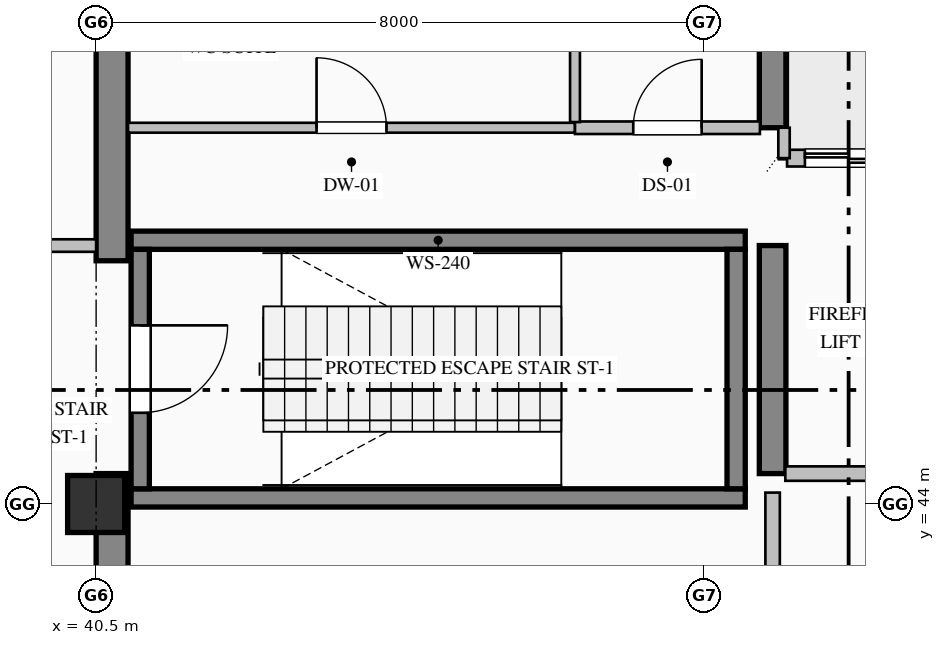
"""IFC4 building model, lengths in metres.
Left out: names, types, materials, properties, quantities, classifications, styles, units other than length and angle.
Written with IfcOpenShell. Run it as: python <this file> out.ifc"""

import sys

from ifc_helpers import new_model, si_unit, direction, frame, frame_2d, origin, origin_2d, place, context, subcontext, project, spatial, rectangle, extrude, element, fill, save


model = new_model("IFC4")
c1 = context("Model", 3, precision=1e-05, world=origin(), true_north=direction((0.0, 1.0)))
c2 = subcontext(c1, "Body", "Model", "MODEL_VIEW")
j1 = project(units=[si_unit("LENGTHUNIT", "METRE"), si_unit("PLANEANGLEUNIT", "RADIAN")], contexts=[c1])
p1 = place(None, origin())
s1 = spatial("IfcSite", under=j1, at=p1, CompositionType="ELEMENT")
p2 = place(p1, origin())
s2 = spatial("IfcBuilding", under=s1, at=p2, CompositionType="ELEMENT")
p3 = place(p2, frame((0.0, 0.0, 373.0)))
s3 = spatial("IfcBuildingStorey", under=s2, at=p3, CompositionType="ELEMENT", Elevation=373.0)
p4 = place(p3, frame((40.71, 36.42, 0.0), z_axis=(0.0, 0.0, 1.0), x_axis=(0.0, 1.0, 0.0)))
e1 = element("IfcWall", 1, at=p4, inside=s3, PredefinedType="SHEAR", context=c2, shape_type="SweptSolid", body=[
    extrude(rectangle(XDim=7.98, YDim=0.42, at=frame_2d((3.99, 0.0))), origin(), (0.0, 0.0, 1.0), 5.11),
])
p5 = place(p3, frame((40.71, 47.2, 0.0), z_axis=(0.0, 0.0, 1.0), x_axis=(0.0, 1.0, 0.0)))
e2 = element("IfcWall", 2, at=p5, inside=s3, PredefinedType="SHEAR", context=c2, shape_type="SweptSolid", body=[
    extrude(rectangle(XDim=4.38, YDim=0.42, at=frame_2d((2.19, 0.0))), origin(), (0.0, 0.0, 1.0), 5.11),
])
p6 = place(p3, frame((49.4, 44.4, 0.0), z_axis=(0.0, 0.0, 1.0), x_axis=(0.0, 1.0, 0.0)))
e3 = element("IfcWall", 3, at=p6, inside=s3, PredefinedType="SHEAR", context=c2, shape_type="SweptSolid", body=[
    extrude(rectangle(XDim=3.0, YDim=0.35, at=frame_2d((1.5, 0.0))), origin(), (0.0, 0.0, 1.0), 5.11),
])
p7 = place(p3, frame((49.4, 48.95, 0.0), z_axis=(0.0, 0.0, 1.0), x_axis=(0.0, 1.0, 0.0)))
e4 = element("IfcWall", 4, at=p7, inside=s3, PredefinedType="SHEAR", context=c2, shape_type="SweptSolid", body=[
    extrude(rectangle(XDim=2.63, YDim=0.35, at=frame_2d((1.315, 0.0))), origin(), (0.0, 0.0, 1.0), 5.11),
])
p8 = place(p3, frame((40.5, 44.0, 0.0), z_axis=(0.0, 0.0, 1.0), x_axis=(1.0, 0.0, 0.0)))
e5 = element("IfcColumn", 5, at=p8, inside=s3, PredefinedType="COLUMN", context=c2, shape_type="SweptSolid", body=[
    extrude(rectangle(XDim=0.75, YDim=0.75, at=origin_2d()), origin(), (0.0, 0.0, 1.0), 5.4),
])
for number, where, z_axis, x_axis in (
    (6, (40.96, 47.47, 0.0), (0.0, 0.0, 1.0), (1.0, 0.0, 0.0)),
    (7, (49.04, 44.08, 0.0), (0.0, 0.0, 1.0), (-1.0, 0.0, 0.0)),
):
    element("IfcWall", number, at=place(p3, frame(where, z_axis=z_axis, x_axis=x_axis)), inside=s3, PredefinedType="SOLIDWALL", context=c2, shape_type="SweptSolid", body=[
        extrude(rectangle(XDim=8.08, YDim=0.24, at=frame_2d((4.04, 0.0))), origin(), (0.0, 0.0, 1.0), 5.4),
    ])
p9 = place(p3, frame((41.08, 47.35, 0.0), z_axis=(0.0, 0.0, 1.0), x_axis=(0.0, -1.0, 0.0)))
e8 = element("IfcWall", 8, at=p9, inside=s3, PredefinedType="SOLIDWALL", context=c2, shape_type="SweptSolid", body=[
    extrude(rectangle(XDim=3.15, YDim=0.24, at=frame_2d((1.575, 0.0))), origin(), (0.0, 0.0, 1.0), 5.4),
])
p10 = place(p9, frame((1.0, 0.0, 0.0)))
e9 = element("IfcOpeningElement", 9, at=p10, cuts=e8, PredefinedType="OPENING", context=c2, shape_type="SweptSolid", body=[
    extrude(rectangle(XDim=1.15, YDim=2.2, at=frame_2d((0.575, 1.1))), frame((0.0, 0.13, 0.0), z_axis=(0.0, -1.0, 0.0), x_axis=(1.0, 0.0, 0.0)), (0.0, 0.0, 1.0), 0.26),
])
p11 = place(p3, frame((48.92, 44.2, 0.0), z_axis=(0.0, 0.0, 1.0), x_axis=(0.0, 1.0, 0.0)))
e10 = element("IfcWall", 10, at=p11, inside=s3, PredefinedType="SOLIDWALL", context=c2, shape_type="SweptSolid", body=[
    extrude(rectangle(XDim=3.15, YDim=0.24, at=frame_2d((1.575, 0.0))), origin(), (0.0, 0.0, 1.0), 5.4),
])
p12 = place(p3, frame((54.71, 48.55, 0.0), z_axis=(0.0, 0.0, 1.0), x_axis=(-1.0, 0.0, 0.0)))
e11 = element("IfcWall", 11, at=p12, inside=s3, PredefinedType="PARTITIONING", context=c2, shape_type="SweptSolid", body=[
    extrude(rectangle(XDim=5.12, YDim=0.22, at=frame_2d((2.56, 0.0))), origin(), (0.0, 0.0, 1.0), 5.11),
])
p13 = place(p12, frame((3.735, 0.0, 0.0)))
e12 = element("IfcOpeningElement", 12, at=p13, cuts=e11, PredefinedType="OPENING", context=c2, shape_type="SweptSolid", body=[
    extrude(rectangle(XDim=1.15, YDim=2.2, at=frame_2d((0.575, 1.1))), frame((0.0, 0.12, 0.0), z_axis=(0.0, -1.0, 0.0), x_axis=(1.0, 0.0, 0.0)), (0.0, 0.0, 1.0), 0.24),
])
p14 = place(p12, frame((0.935, 0.0, 0.0)))
e13 = element("IfcOpeningElement", 13, at=p14, cuts=e11, PredefinedType="OPENING", context=c2, shape_type="SweptSolid", body=[
    extrude(rectangle(XDim=1.15, YDim=2.2, at=frame_2d((0.575, 1.1))), frame((0.0, 0.12, 0.0), z_axis=(0.0, -1.0, 0.0), x_axis=(1.0, 0.0, 0.0)), (0.0, 0.0, 1.0), 0.24),
])
p15 = place(p3, frame((49.55, 48.55, 0.0), z_axis=(0.0, 0.0, 1.0), x_axis=(0.0, 1.0, 0.0)))
e14 = element("IfcWall", 14, at=p15, inside=s3, PredefinedType="PARTITIONING", context=c2, shape_type="SweptSolid", body=[
    extrude(rectangle(XDim=0.4, YDim=0.15, at=frame_2d((0.2, 0.0))), origin(), (0.0, 0.0, 1.0), 5.11),
])
p16 = place(p3, frame((37.8, 47.4, 0.0), z_axis=(0.0, 0.0, 1.0), x_axis=(1.0, 0.0, 0.0)))
e15 = element("IfcWall", 15, at=p16, inside=s3, PredefinedType="PARTITIONING", context=c2, shape_type="SweptSolid", body=[
    extrude(rectangle(XDim=2.7, YDim=0.165, at=frame_2d((1.35, 0.0))), origin(), (0.0, 0.0, 1.0), 5.11),
])
p17 = place(p16, frame((0.825, 0.0, 0.0)))
e16 = element("IfcOpeningElement", 16, at=p17, cuts=e15, PredefinedType="OPENING", context=c2, shape_type="SweptSolid", body=[
    extrude(rectangle(XDim=1.05, YDim=2.15, at=frame_2d((0.525, 1.075))), frame((0.0, 0.093, 0.0), z_axis=(0.0, -1.0, 0.0), x_axis=(1.0, 0.0, 0.0)), (0.0, 0.0, 1.0), 0.185),
])
p18 = place(p3, frame((40.92, 48.95, 0.0), z_axis=(0.0, 0.0, 1.0), x_axis=(1.0, 0.0, 0.0)))
e17 = element("IfcWall", 17, at=p18, inside=s3, PredefinedType="PARTITIONING", context=c2, shape_type="SweptSolid", body=[
    extrude(rectangle(XDim=5.88, YDim=0.13, at=frame_2d((2.94, 0.0))), origin(), (0.0, 0.0, 1.0), 5.11),
])
p19 = place(p18, frame((2.48, 0.0, 0.0)))
e18 = element("IfcOpeningElement", 18, at=p19, cuts=e17, PredefinedType="OPENING", context=c2, shape_type="SweptSolid", body=[
    extrude(rectangle(XDim=0.92, YDim=2.15, at=frame_2d((0.46, 1.075))), frame((0.0, 0.075, 0.0), z_axis=(0.0, -1.0, 0.0), x_axis=(1.0, 0.0, 0.0)), (0.0, 0.0, 1.0), 0.15),
])
p20 = place(p3, frame((46.8, 48.95, 0.0), z_axis=(0.0, 0.0, 1.0), x_axis=(1.0, 0.0, 0.0)))
e19 = element("IfcWall", 19, at=p20, inside=s3, PredefinedType="PARTITIONING", context=c2, shape_type="SweptSolid", body=[
    extrude(rectangle(XDim=2.433, YDim=0.165, at=frame_2d((1.216, 0.0))), origin(), (0.0, 0.0, 1.0), 5.11),
])
p21 = place(p20, frame((0.767, 0.0, 0.0)))
e20 = element("IfcOpeningElement", 20, at=p21, cuts=e19, PredefinedType="OPENING", context=c2, shape_type="SweptSolid", body=[
    extrude(rectangle(XDim=0.9, YDim=2.15, at=frame_2d((0.45, 1.075))), frame((0.0, 0.093, 0.0), z_axis=(0.0, -1.0, 0.0), x_axis=(1.0, 0.0, 0.0)), (0.0, 0.0, 1.0), 0.185),
])
p22 = place(p3, frame((54.733, 44.4, 0.0), z_axis=(0.0, 0.0, 1.0), x_axis=(-1.0, 0.0, 0.0)))
e21 = element("IfcWall", 21, at=p22, inside=s3, PredefinedType="PARTITIONING", context=c2, shape_type="SweptSolid", body=[
    extrude(rectangle(XDim=5.166, YDim=0.19, at=frame_2d((2.583, 0.0))), origin(), (0.0, 0.0, 1.0), 5.11),
])
p23 = place(p22, frame((2.058, 0.0, 0.0)))
e22 = element("IfcOpeningElement", 22, at=p23, cuts=e21, PredefinedType="OPENING", context=c2, shape_type="SweptSolid", body=[
    extrude(rectangle(XDim=1.05, YDim=2.15, at=frame_2d((0.525, 1.075))), frame((0.0, 0.105, 0.0), z_axis=(0.0, -1.0, 0.0), x_axis=(1.0, 0.0, 0.0)), (0.0, 0.0, 1.0), 0.21),
])
p24 = place(p3, frame((49.4, 40.487, 0.0), z_axis=(0.0, 0.0, 1.0), x_axis=(0.0, 1.0, 0.0)))
e23 = element("IfcWall", 23, at=p24, inside=s3, PredefinedType="PARTITIONING", context=c2, shape_type="SweptSolid", body=[
    extrude(rectangle(XDim=3.663, YDim=0.19, at=frame_2d((1.832, 0.0))), origin(), (0.0, 0.0, 1.0), 4.352),
])
p25 = place(p24, frame((1.132, 0.0, 0.0)))
e24 = element("IfcOpeningElement", 24, at=p25, cuts=e23, PredefinedType="OPENING", context=c2, shape_type="SweptSolid", body=[
    extrude(rectangle(XDim=1.4, YDim=2.25, at=frame_2d((0.7, 1.125))), frame((0.0, 0.105, 0.0), z_axis=(0.0, -1.0, 0.0), x_axis=(1.0, 0.0, 0.0)), (0.0, 0.0, 1.0), 0.21),
])
p26 = place(p3, frame((46.8, 51.58, 0.0), z_axis=(0.0, 0.0, 1.0), x_axis=(0.0, -1.0, 0.0)))
e25 = element("IfcWall", 25, at=p26, inside=s3, PredefinedType="PARTITIONING", context=c2, shape_type="SweptSolid", body=[
    extrude(rectangle(XDim=2.556, YDim=0.13, at=frame_2d((1.278, 0.0))), origin(), (0.0, 0.0, 1.0), 5.11),
])
p27 = place(p10, origin())
e26 = element("IfcDoor", 26, at=p27, inside=s3, OperationType="SINGLE_SWING_LEFT", PredefinedType="DOOR", context=c2, shape_type="SweptSolid", body=[
    extrude(rectangle(XDim=1.15, YDim=2.2, at=frame_2d((0.575, 1.1))), frame((0.0, 0.025, 0.0), z_axis=(0.0, -1.0, 0.0), x_axis=(1.0, 0.0, 0.0)), (0.0, 0.0, 1.0), 0.05),
])
fill(e9, e26)
p28 = place(p13, origin())
e27 = element("IfcDoor", 27, at=p28, inside=s3, OperationType="DOUBLE_DOOR_SLIDING", PredefinedType="DOOR", context=c2, shape_type="SweptSolid", body=[
    extrude(rectangle(XDim=1.15, YDim=2.2, at=frame_2d((0.575, 1.1))), frame((0.0, 0.025, 0.0), z_axis=(0.0, -1.0, 0.0), x_axis=(1.0, 0.0, 0.0)), (0.0, 0.0, 1.0), 0.05),
])
fill(e12, e27)
p29 = place(p19, origin())
e28 = element("IfcDoor", 28, at=p29, inside=s3, OperationType="SINGLE_SWING_LEFT", PredefinedType="DOOR", context=c2, shape_type="SweptSolid", body=[
    extrude(rectangle(XDim=0.92, YDim=2.15, at=frame_2d((0.46, 1.075))), frame((0.0, 0.025, 0.0), z_axis=(0.0, -1.0, 0.0), x_axis=(1.0, 0.0, 0.0)), (0.0, 0.0, 1.0), 0.05),
])
fill(e18, e28)
p30 = place(p21, origin())
e29 = element("IfcDoor", 29, at=p30, inside=s3, OperationType="SINGLE_SWING_RIGHT", PredefinedType="DOOR", context=c2, shape_type="SweptSolid", body=[
    extrude(rectangle(XDim=0.9, YDim=2.15, at=frame_2d((0.45, 1.075))), frame((0.0, 0.025, 0.0), z_axis=(0.0, -1.0, 0.0), x_axis=(1.0, 0.0, 0.0)), (0.0, 0.0, 1.0), 0.05),
])
fill(e20, e29)
save(model, sys.argv[1])
